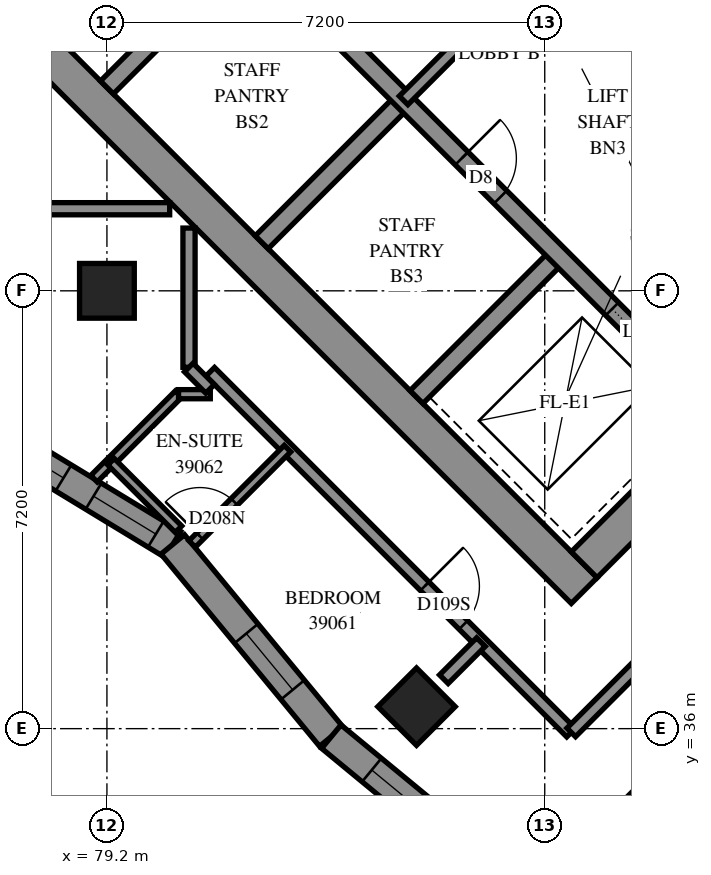
"""IFC4 building model, lengths in metres.
Left out: names, types, materials, properties, quantities, classifications, styles, units other than length and angle.
Written with IfcOpenShell. Run it as: python <this file> out.ifc"""

import sys

from ifc_helpers import new_model, si_unit, direction, frame, frame_2d, origin, origin_2d, place, context, subcontext, project, spatial, polyline, rectangle, outline, extrude, element, fill, save


model = new_model("IFC4")
c1 = context("Model", 3, precision=1e-05, world=origin(), true_north=direction((0.0, 1.0)))
c2 = subcontext(c1, "Body", "Model", "MODEL_VIEW")
j1 = project(units=[si_unit("LENGTHUNIT", "METRE"), si_unit("PLANEANGLEUNIT", "RADIAN")], contexts=[c1])
p1 = place(None, origin())
s1 = spatial("IfcSite", under=j1, at=p1, CompositionType="ELEMENT")
p2 = place(p1, origin())
s2 = spatial("IfcBuilding", under=s1, at=p2, CompositionType="ELEMENT")
p3 = place(p2, frame((0.0, 0.0, 145.6)))
s3 = spatial("IfcBuildingStorey", under=s2, at=p3, CompositionType="ELEMENT", Elevation=145.6)
for number, where, z_axis, x_axis in (
    (1, (79.2, 43.2, 0.0), (0.0, 0.0, 1.0), (1.0, 0.0, 0.0)),
    (2, (84.291, 36.362, 0.0), (0.0, 0.0, 1.0), (0.707, -0.707, 0.0)),
):
    element("IfcColumn", number, at=place(p3, frame(where, z_axis=z_axis, x_axis=x_axis)), inside=s3, PredefinedType="COLUMN", context=c2, shape_type="SweptSolid", body=[
        extrude(rectangle(XDim=0.9, YDim=0.9, at=origin_2d()), origin(), (0.0, 0.0, 1.0), 3.1),
    ])
p4 = place(p3, frame((76.018, 49.302, -0.3), z_axis=(0.0, 0.0, 1.0), x_axis=(0.7071067812, -0.7071067812, 0.0)))
e3 = element("IfcWall", 3, at=p4, inside=s3, PredefinedType="SHEAR", context=c2, shape_type="SweptSolid", body=[
    extrude(rectangle(XDim=15.6, YDim=0.6, at=frame_2d((7.8, 0.0))), origin(), (0.0, 0.0, 1.0), 2.7),
])
p5 = place(p3, frame((87.049, 38.695, -0.3), z_axis=(0.0, 0.0, 1.0), x_axis=(0.7071067812, 0.7071067812, 0.0)))
e4 = element("IfcWall", 4, at=p5, inside=s3, PredefinedType="SHEAR", context=c2, shape_type="SweptSolid", body=[
    extrude(rectangle(XDim=14.4, YDim=0.6, at=frame_2d((7.2, 0.0))), origin(), (0.0, 0.0, 1.0), 2.7),
])
p6 = place(p5, frame((4.55, 0.0, 0.3)))
e5 = element("IfcOpeningElement", 5, at=p6, cuts=e4, PredefinedType="OPENING", context=c2, shape_type="SweptSolid", body=[
    extrude(rectangle(XDim=1.1, YDim=2.1, at=frame_2d((0.55, 1.05))), frame((0.0, 0.31, 0.0), z_axis=(0.0, -1.0, 0.0), x_axis=(1.0, 0.0, 0.0)), (0.0, 0.0, 1.0), 0.62),
])
p7 = place(p5, frame((11.35, 0.0, 0.3)))
e6 = element("IfcOpeningElement", 6, at=p7, cuts=e4, PredefinedType="OPENING", context=c2, shape_type="SweptSolid", body=[
    extrude(rectangle(XDim=1.1, YDim=2.1, at=frame_2d((0.55, 1.05))), frame((0.0, 0.31, 0.0), z_axis=(0.0, -1.0, 0.0), x_axis=(1.0, 0.0, 0.0)), (0.0, 0.0, 1.0), 0.62),
])
p8 = place(p3, frame((79.2, 46.544, 0.0), z_axis=(0.0, 0.0, 1.0), x_axis=(0.7071219326, 0.7070916295, 0.0)))
e7 = element("IfcWall", 7, at=p8, inside=s3, PredefinedType="SOLIDWALL", context=c2, shape_type="SweptSolid", body=[
    extrude(rectangle(XDim=3.3, YDim=0.3, at=frame_2d((1.65, 0.0))), origin(), (0.0, 0.0, 1.0), 3.1),
])
for number, where, z_axis, x_axis in (
    (8, (81.746, 43.999, 0.0), (0.0, 0.0, 1.0), (0.707, 0.707, 0.0)),
    (9, (84.291, 41.453, 0.0), (0.0, 0.0, 1.0), (0.707, 0.707, 0.0)),
):
    element("IfcWall", number, at=place(p3, frame(where, z_axis=z_axis, x_axis=x_axis)), inside=s3, PredefinedType="SOLIDWALL", context=c2, shape_type="SweptSolid", body=[
        extrude(rectangle(XDim=3.3, YDim=0.3, at=frame_2d((1.65, 0.0))), origin(), (0.0, 0.0, 1.0), 3.1),
    ])
p9 = place(p3, frame((78.988, 51.423, 0.0), z_axis=(0.0, 0.0, 1.0), x_axis=(0.7071067812, -0.7071067812, 0.0)))
e10 = element("IfcWall", 10, at=p9, inside=s3, PredefinedType="SOLIDWALL", context=c2, shape_type="SweptSolid", body=[
    extrude(rectangle(XDim=14.4, YDim=0.3, at=frame_2d((7.2, 0.0))), origin(), (0.0, 0.0, 1.0), 3.1),
])
p10 = place(p9, frame((1.35, 0.0, 0.0)))
e11 = element("IfcOpeningElement", 11, at=p10, cuts=e10, PredefinedType="OPENING", context=c2, shape_type="SweptSolid", body=[
    extrude(rectangle(XDim=0.9, YDim=2.1, at=frame_2d((0.45, 1.05))), frame((0.0, 0.16, 0.0), z_axis=(0.0, -1.0, 0.0), x_axis=(1.0, 0.0, 0.0)), (0.0, 0.0, 1.0), 0.32),
])
p11 = place(p9, frame((4.95, 0.0, 0.0)))
e12 = element("IfcOpeningElement", 12, at=p11, cuts=e10, PredefinedType="OPENING", context=c2, shape_type="SweptSolid", body=[
    extrude(rectangle(XDim=0.9, YDim=2.1, at=frame_2d((0.45, 1.05))), frame((0.0, 0.16, 0.0), z_axis=(0.0, -1.0, 0.0), x_axis=(1.0, 0.0, 0.0)), (0.0, 0.0, 1.0), 0.32),
])
p12 = place(p9, frame((8.55, 0.0, 0.0)))
e13 = element("IfcOpeningElement", 13, at=p12, cuts=e10, PredefinedType="OPENING", context=c2, shape_type="SweptSolid", body=[
    extrude(rectangle(XDim=0.9, YDim=2.1, at=frame_2d((0.45, 1.05))), frame((0.0, 0.16, 0.0), z_axis=(0.0, -1.0, 0.0), x_axis=(1.0, 0.0, 0.0)), (0.0, 0.0, 1.0), 0.32),
])
p13 = place(p9, frame((12.05, 0.0, 0.0)))
e14 = element("IfcOpeningElement", 14, at=p13, cuts=e10, PredefinedType="OPENING", context=c2, shape_type="SweptSolid", body=[
    extrude(rectangle(XDim=1.1, YDim=2.1, at=frame_2d((0.55, 1.05))), frame((0.0, 0.16, 0.0), z_axis=(0.0, -1.0, 0.0), x_axis=(1.0, 0.0, 0.0)), (0.0, 0.0, 1.0), 0.32),
])
p14 = place(p3, frame((81.534, 53.969, 0.0), z_axis=(0.0, 0.0, 1.0), x_axis=(0.707103309, -0.7071102534, 0.0)))
e15 = element("IfcWall", 15, at=p14, inside=s3, PredefinedType="SOLIDWALL", context=c2, shape_type="SweptSolid", body=[
    extrude(rectangle(XDim=14.4, YDim=0.3, at=frame_2d((7.2, 0.0))), origin(), (0.0, 0.0, 1.0), 3.1),
])
p15 = place(p14, frame((1.25, 0.0, 0.0)))
e16 = element("IfcOpeningElement", 16, at=p15, cuts=e15, PredefinedType="OPENING", context=c2, shape_type="SweptSolid", body=[
    extrude(rectangle(XDim=1.1, YDim=2.1, at=frame_2d((0.55, 1.05))), frame((0.0, 0.16, 0.0), z_axis=(0.0, -1.0, 0.0), x_axis=(1.0, 0.0, 0.0)), (0.0, 0.0, 1.0), 0.32),
])
p16 = place(p14, frame((4.85, 0.0, 0.0)))
e17 = element("IfcOpeningElement", 17, at=p16, cuts=e15, PredefinedType="OPENING", context=c2, shape_type="SweptSolid", body=[
    extrude(rectangle(XDim=1.1, YDim=2.1, at=frame_2d((0.55, 1.05))), frame((0.0, 0.16, 0.0), z_axis=(0.0, -1.0, 0.0), x_axis=(1.0, 0.0, 0.0)), (0.0, 0.0, 1.0), 0.32),
])
p17 = place(p14, frame((8.45, 0.0, 0.0)))
e18 = element("IfcOpeningElement", 18, at=p17, cuts=e15, PredefinedType="OPENING", context=c2, shape_type="SweptSolid", body=[
    extrude(rectangle(XDim=1.1, YDim=2.1, at=frame_2d((0.55, 1.05))), frame((0.0, 0.16, 0.0), z_axis=(0.0, -1.0, 0.0), x_axis=(1.0, 0.0, 0.0)), (0.0, 0.0, 1.0), 0.32),
])
p18 = place(p14, frame((12.05, 0.0, 0.0)))
e19 = element("IfcOpeningElement", 19, at=p18, cuts=e15, PredefinedType="OPENING", context=c2, shape_type="SweptSolid", body=[
    extrude(rectangle(XDim=1.1, YDim=2.1, at=frame_2d((0.55, 1.05))), frame((0.0, 0.16, 0.0), z_axis=(0.0, -1.0, 0.0), x_axis=(1.0, 0.0, 0.0)), (0.0, 0.0, 1.0), 0.32),
])
p19 = place(p3, frame((76.647, 41.24, 0.0), z_axis=(0.0, 0.0, 1.0), x_axis=(0.8545971976, -0.5192914691, 0.0)))
e20 = element("IfcWall", 20, at=p19, inside=s3, PredefinedType="SOLIDWALL", context=c2, shape_type="SweptSolid", body=[
    extrude(outline(polyline([(0.033, -0.25), (4.213, -0.25), (4.298, 0.25), (-0.033, 0.25), (0.033, -0.25)])), origin(), (0.0, 0.0, 1.0), 3.1),
])
p20 = place(p19, frame((0.952, 0.0, 0.45)))
e21 = element("IfcOpeningElement", 21, at=p20, cuts=e20, PredefinedType="OPENING", context=c2, shape_type="SweptSolid", body=[
    extrude(rectangle(XDim=1.2, YDim=2.5, at=frame_2d((0.6, 1.25))), frame((0.0, 0.26, 0.0), z_axis=(0.0, -1.0, 0.0), x_axis=(1.0, 0.0, 0.0)), (0.0, 0.0, 1.0), 0.52),
])
p21 = place(p19, frame((2.729, 0.0, 0.45)))
e22 = element("IfcOpeningElement", 22, at=p21, cuts=e20, PredefinedType="OPENING", context=c2, shape_type="SweptSolid", body=[
    extrude(rectangle(XDim=1.2, YDim=2.5, at=frame_2d((0.6, 1.25))), frame((0.0, 0.26, 0.0), z_axis=(0.0, -1.0, 0.0), x_axis=(1.0, 0.0, 0.0)), (0.0, 0.0, 1.0), 0.52),
])
p22 = place(p3, frame((80.283, 39.03, 0.0), z_axis=(0.0, 0.0, 1.0), x_axis=(0.6360656097, -0.7716349786, 0.0)))
e23 = element("IfcWall", 23, at=p22, inside=s3, PredefinedType="SOLIDWALL", context=c2, shape_type="SweptSolid", body=[
    extrude(outline(polyline([(0.042, -0.25), (4.122, -0.25), (4.074, 0.25), (-0.042, 0.25), (0.042, -0.25)])), origin(), (0.0, 0.0, 1.0), 3.1),
])
p23 = place(p22, frame((1.9, 0.0, 0.45)))
e24 = element("IfcOpeningElement", 24, at=p23, cuts=e23, PredefinedType="OPENING", context=c2, shape_type="SweptSolid", body=[
    extrude(rectangle(XDim=1.2, YDim=2.5, at=frame_2d((0.6, 1.25))), frame((0.0, 0.26, 0.0), z_axis=(0.0, -1.0, 0.0), x_axis=(1.0, 0.0, 0.0)), (0.0, 0.0, 1.0), 0.52),
])
p24 = place(p3, frame((82.89, 35.868, 0.0), z_axis=(0.0, 0.0, 1.0), x_axis=(0.7716322406, -0.6360689312, 0.0)))
e25 = element("IfcWall", 25, at=p24, inside=s3, PredefinedType="SOLIDWALL", context=c2, shape_type="SweptSolid", body=[
    extrude(outline(polyline([(-0.024, -0.25), (4.055, -0.25), (4.103, 0.25), (0.024, 0.25), (-0.024, -0.25)])), origin(), (0.0, 0.0, 1.0), 3.1),
])
p25 = place(p24, frame((0.862, 0.0, 0.45)))
e26 = element("IfcOpeningElement", 26, at=p25, cuts=e25, PredefinedType="OPENING", context=c2, shape_type="SweptSolid", body=[
    extrude(rectangle(XDim=2.8, YDim=2.5, at=frame_2d((1.4, 1.25))), frame((0.0, 0.26, 0.0), z_axis=(0.0, -1.0, 0.0), x_axis=(1.0, 0.0, 0.0)), (0.0, 0.0, 1.0), 0.52),
])
p26 = place(p3, frame((84.079, 46.332, 0.0), z_axis=(0.0, 0.0, 1.0), x_axis=(0.7071067812, 0.7071067812, 0.0)))
e27 = element("IfcWall", 27, at=p26, inside=s3, PredefinedType="PARTITIONING", context=c2, shape_type="SweptSolid", body=[
    extrude(rectangle(XDim=3.6, YDim=0.2, at=frame_2d((1.8, 0.0))), origin(), (0.0, 0.0, 1.0), 3.1),
])
p27 = place(p3, frame((80.899, 41.869, 0.0), z_axis=(0.0, 0.0, 1.0), x_axis=(0.7071067812, -0.7071067812, 0.0)))
e28 = element("IfcWall", 28, at=p27, inside=s3, PredefinedType="PARTITIONING", context=c2, shape_type="SweptSolid", body=[
    extrude(rectangle(XDim=8.392, YDim=0.2, at=frame_2d((4.196, 0.0))), origin(), (0.0, 0.0, 1.0), 3.1),
])
p28 = place(p27, frame((4.988, 0.0, 0.0)))
e29 = element("IfcOpeningElement", 29, at=p28, cuts=e28, PredefinedType="OPENING", context=c2, shape_type="SweptSolid", body=[
    extrude(rectangle(XDim=0.9, YDim=2.1, at=frame_2d((0.45, 1.05))), frame((0.0, 0.11, 0.0), z_axis=(0.0, -1.0, 0.0), x_axis=(1.0, 0.0, 0.0)), (0.0, 0.0, 1.0), 0.22),
])
p29 = place(p3, frame((86.836, 35.938, 0.0), z_axis=(0.0, 0.0, 1.0), x_axis=(0.7071067812, 0.7071067812, 0.0)))
e30 = element("IfcWall", 30, at=p29, inside=s3, PredefinedType="PARTITIONING", context=c2, shape_type="SweptSolid", body=[
    extrude(rectangle(XDim=8.2, YDim=0.2, at=frame_2d((4.1, 0.0))), origin(), (0.0, 0.0, 1.0), 3.1),
])
p30 = place(p3, frame((86.33, 33.311, 0.0), z_axis=(0.0, 0.0, 1.0), x_axis=(0.7071005425, 0.7071130198, 0.0)))
e31 = element("IfcWall", 31, at=p30, inside=s3, PredefinedType="PARTITIONING", context=c2, shape_type="SweptSolid", body=[
    extrude(rectangle(XDim=8.015, YDim=0.2, at=frame_2d((4.007, 0.0))), origin(), (0.0, 0.0, 1.0), 3.1),
])
for number, where, z_axis, x_axis in (
    (32, (77.942, 44.55, 0.0), (0.0, 0.0, 1.0), (1.0, 0.0, 0.0)),
    (33, (80.55, 41.942, 0.0), (0.0, 0.0, 1.0), (0.0, 1.0, 0.0)),
):
    element("IfcWall", number, at=place(p3, frame(where, z_axis=z_axis, x_axis=x_axis)), inside=s3, PredefinedType="PARTITIONING", context=c2, shape_type="SweptSolid", body=[
        extrude(rectangle(XDim=2.29, YDim=0.2, at=frame_2d((1.145, 0.0))), origin(), (0.0, 0.0, 1.0), 3.1),
    ])
p31 = place(p3, frame((80.601, 39.038, 0.0), z_axis=(0.0, 0.0, 1.0), x_axis=(0.7071293353, 0.7070842263, 0.0)))
e34 = element("IfcWall", 34, at=p31, inside=s3, PredefinedType="PARTITIONING", context=c2, shape_type="SweptSolid", body=[
    extrude(rectangle(XDim=2.217, YDim=0.15, at=frame_2d((1.108, 0.0))), origin(), (0.0, 0.0, 1.0), 3.1),
])
p32 = place(p31, frame((0.18, 0.0, 0.0)))
e35 = element("IfcOpeningElement", 35, at=p32, cuts=e34, PredefinedType="OPENING", context=c2, shape_type="SweptSolid", body=[
    extrude(rectangle(XDim=0.8, YDim=2.1, at=frame_2d((0.4, 1.05))), frame((0.0, 0.085, 0.0), z_axis=(0.0, -1.0, 0.0), x_axis=(1.0, 0.0, 0.0)), (0.0, 0.0, 1.0), 0.17),
])
p33 = place(p3, frame((78.987, 40.11, 0.0), z_axis=(0.0, 0.0, 1.0), x_axis=(0.7071322117, 0.7070813498, 0.0)))
e36 = element("IfcWall", 36, at=p33, inside=s3, PredefinedType="PARTITIONING", context=c2, shape_type="SweptSolid", body=[
    extrude(rectangle(XDim=1.966, YDim=0.15, at=frame_2d((0.983, 0.0))), origin(), (0.0, 0.0, 1.0), 3.1),
])
p34 = place(p3, frame((79.267, 40.389, 0.0), z_axis=(0.0, 0.0, 1.0), x_axis=(0.7071386479, -0.707074913, 0.0)))
e37 = element("IfcWall", 37, at=p34, inside=s3, PredefinedType="PARTITIONING", context=c2, shape_type="SweptSolid", body=[
    extrude(rectangle(XDim=1.569, YDim=0.15, at=frame_2d((0.784, 0.0))), origin(), (0.0, 0.0, 1.0), 3.1),
])
p35 = place(p3, frame((84.741, 36.813, 0.0), z_axis=(0.0, 0.0, 1.0), x_axis=(0.7071067812, 0.7071067812, 0.0)))
e38 = element("IfcWall", 38, at=p35, inside=s3, PredefinedType="PARTITIONING", context=c2, shape_type="SweptSolid", body=[
    extrude(rectangle(XDim=0.863, YDim=0.2, at=frame_2d((0.431, 0.0))), origin(), (0.0, 0.0, 1.0), 3.1),
])
p36 = place(p3, frame((80.378, 41.5, 0.0), z_axis=(0.0, 0.0, 1.0), x_axis=(1.0, 0.0, 0.0)))
e39 = element("IfcWall", 39, at=p36, inside=s3, PredefinedType="PARTITIONING", context=c2, shape_type="SweptSolid", body=[
    extrude(rectangle(XDim=0.522, YDim=0.15, at=frame_2d((0.261, 0.0))), origin(), (0.0, 0.0, 1.0), 3.1),
])
p37 = place(p3, frame((80.546, 41.938, 0.0), z_axis=(0.0, 0.0, 1.0), x_axis=(0.7071067812, -0.7071067812, 0.0)))
e40 = element("IfcWall", 40, at=p37, inside=s3, PredefinedType="PARTITIONING", context=c2, shape_type="SweptSolid", body=[
    extrude(rectangle(XDim=0.495, YDim=0.2, at=frame_2d((0.247, 0.0))), origin(), (0.0, 0.0, 1.0), 3.1),
])
p38 = place(p20, origin())
e41 = element("IfcWindow", 41, at=p38, inside=s3, PartitioningType="SINGLE_PANEL", PredefinedType="WINDOW", context=c2, shape_type="SweptSolid", body=[
    extrude(rectangle(XDim=1.2, YDim=2.5, at=frame_2d((0.6, 1.25))), frame((0.0, 0.18, 0.0), z_axis=(0.0, -1.0, 0.0), x_axis=(1.0, 0.0, 0.0)), (0.0, 0.0, 1.0), 0.06),
])
fill(e21, e41)
p39 = place(p21, origin())
e42 = element("IfcWindow", 42, at=p39, inside=s3, PartitioningType="SINGLE_PANEL", PredefinedType="WINDOW", context=c2, shape_type="SweptSolid", body=[
    extrude(rectangle(XDim=1.2, YDim=2.5, at=frame_2d((0.6, 1.25))), frame((0.0, 0.18, 0.0), z_axis=(0.0, -1.0, 0.0), x_axis=(1.0, 0.0, 0.0)), (0.0, 0.0, 1.0), 0.06),
])
fill(e22, e42)
p40 = place(p23, origin())
e43 = element("IfcWindow", 43, at=p40, inside=s3, PartitioningType="SINGLE_PANEL", PredefinedType="WINDOW", context=c2, shape_type="SweptSolid", body=[
    extrude(rectangle(XDim=1.2, YDim=2.5, at=frame_2d((0.6, 1.25))), frame((0.0, 0.18, 0.0), z_axis=(0.0, -1.0, 0.0), x_axis=(1.0, 0.0, 0.0)), (0.0, 0.0, 1.0), 0.06),
])
fill(e24, e43)
p41 = place(p25, origin())
e44 = element("IfcWindow", 44, at=p41, inside=s3, PartitioningType="SINGLE_PANEL", PredefinedType="WINDOW", context=c2, shape_type="SweptSolid", body=[
    extrude(rectangle(XDim=2.8, YDim=2.5, at=frame_2d((1.4, 1.25))), frame((0.0, 0.18, 0.0), z_axis=(0.0, -1.0, 0.0), x_axis=(1.0, 0.0, 0.0)), (0.0, 0.0, 1.0), 0.06),
])
fill(e26, e44)
p42 = place(p12, origin())
e45 = element("IfcDoor", 45, at=p42, inside=s3, OperationType="SINGLE_SWING_LEFT", PredefinedType="DOOR", context=c2, shape_type="SweptSolid", body=[
    extrude(rectangle(XDim=0.9, YDim=2.1, at=frame_2d((0.45, 1.05))), frame((0.0, 0.025, 0.0), z_axis=(0.0, -1.0, 0.0), x_axis=(1.0, 0.0, 0.0)), (0.0, 0.0, 1.0), 0.05),
])
fill(e13, e45)
p43 = place(p13, origin())
e46 = element("IfcDoor", 46, at=p43, inside=s3, OperationType="SLIDING_TO_RIGHT", PredefinedType="DOOR", context=c2, shape_type="SweptSolid", body=[
    extrude(rectangle(XDim=1.1, YDim=2.1, at=frame_2d((0.55, 1.05))), frame((0.0, 0.025, 0.0), z_axis=(0.0, -1.0, 0.0), x_axis=(1.0, 0.0, 0.0)), (0.0, 0.0, 1.0), 0.05),
])
fill(e14, e46)
p44 = place(p28, origin())
e47 = element("IfcDoor", 47, at=p44, inside=s3, OperationType="SINGLE_SWING_RIGHT", PredefinedType="DOOR", context=c2, shape_type="SweptSolid", body=[
    extrude(rectangle(XDim=0.9, YDim=2.1, at=frame_2d((0.45, 1.05))), frame((0.0, 0.025, 0.0), z_axis=(0.0, -1.0, 0.0), x_axis=(1.0, 0.0, 0.0)), (0.0, 0.0, 1.0), 0.05),
])
fill(e29, e47)
p45 = place(p32, origin())
e48 = element("IfcDoor", 48, at=p45, inside=s3, OperationType="SINGLE_SWING_RIGHT", PredefinedType="DOOR", context=c2, shape_type="SweptSolid", body=[
    extrude(rectangle(XDim=0.8, YDim=2.1, at=frame_2d((0.4, 1.05))), frame((0.0, 0.025, 0.0), z_axis=(0.0, -1.0, 0.0), x_axis=(1.0, 0.0, 0.0)), (0.0, 0.0, 1.0), 0.05),
])
fill(e35, e48)
save(model, sys.argv[1])
